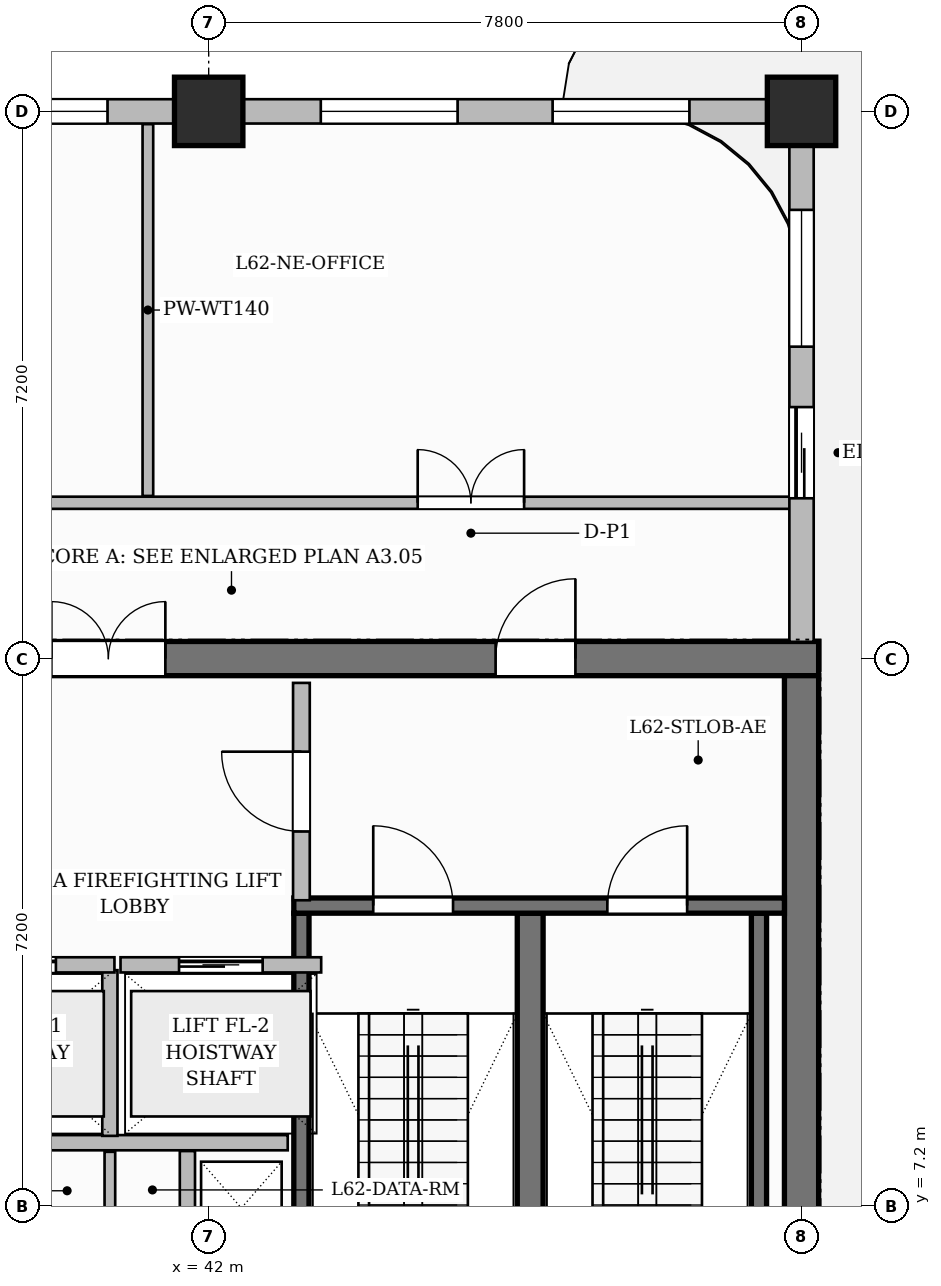
"""IFC4 building model, lengths in metres.
Left out: names, types, materials, properties, quantities, classifications, styles, units other than length and angle.
Written with IfcOpenShell. Run it as: python <this file> out.ifc"""

import sys

from ifc_helpers import new_model, si_unit, direction, frame, frame_2d, origin, origin_2d, place, context, subcontext, project, spatial, rectangle, extrude, source, transform, mapped, element, fill, save


model = new_model("IFC4")
c1 = context("Model", 3, precision=1e-05, world=origin(), true_north=direction((0.0, 1.0)))
c2 = subcontext(c1, "Body", "Model", "MODEL_VIEW")
j1 = project(units=[si_unit("LENGTHUNIT", "METRE"), si_unit("PLANEANGLEUNIT", "RADIAN")], contexts=[c1])
p1 = place(None, origin())
s1 = spatial("IfcSite", under=j1, at=p1, CompositionType="ELEMENT")
p2 = place(p1, origin())
s2 = spatial("IfcBuilding", under=s1, at=p2, CompositionType="ELEMENT")
p3 = place(p2, frame((0.0, 0.0, 248.1)))
s3 = spatial("IfcBuildingStorey", under=s2, at=p3, CompositionType="ELEMENT", Elevation=248.1)
p4 = place(p3, frame((34.575, 14.4, 0.0), z_axis=(0.0, 0.0, 1.0), x_axis=(1.0, 0.0, 0.0)))
e1 = element("IfcWall", 1, at=p4, inside=s3, PredefinedType="SHEAR", context=c2, shape_type="SweptSolid", body=[
    extrude(rectangle(XDim=15.45, YDim=0.45, at=frame_2d((7.725, 0.0))), origin(), (0.0, 0.0, 1.0), 3.85),
])
p5 = place(p4, frame((5.355, 0.0, 0.0)))
e2 = element("IfcOpeningElement", 2, at=p5, cuts=e1, PredefinedType="OPENING", context=c2, shape_type="SweptSolid", body=[
    extrude(rectangle(XDim=1.5, YDim=2.2, at=frame_2d((0.75, 1.1))), frame((0.0, 0.235, 0.0), z_axis=(0.0, -1.0, 0.0), x_axis=(1.0, 0.0, 0.0)), (0.0, 0.0, 1.0), 0.47),
])
p6 = place(p4, frame((1.57, 0.0, 0.0)))
e3 = element("IfcOpeningElement", 3, at=p6, cuts=e1, PredefinedType="OPENING", context=c2, shape_type="SweptSolid", body=[
    extrude(rectangle(XDim=1.05, YDim=2.15, at=frame_2d((0.525, 1.075))), frame((0.0, 0.235, 0.0), z_axis=(0.0, -1.0, 0.0), x_axis=(1.0, 0.0, 0.0)), (0.0, 0.0, 1.0), 0.47),
])
p7 = place(p4, frame((11.2, 0.0, 0.0)))
e4 = element("IfcOpeningElement", 4, at=p7, cuts=e1, PredefinedType="OPENING", context=c2, shape_type="SweptSolid", body=[
    extrude(rectangle(XDim=1.05, YDim=2.15, at=frame_2d((0.525, 1.075))), frame((0.0, 0.235, 0.0), z_axis=(0.0, -1.0, 0.0), x_axis=(1.0, 0.0, 0.0)), (0.0, 0.0, 1.0), 0.47),
])
p8 = place(p3, frame((49.8, 3.825, 0.0), z_axis=(0.0, 0.0, 1.0), x_axis=(0.0, 1.0, 0.0)))
e5 = element("IfcWall", 5, at=p8, inside=s3, PredefinedType="SHEAR", context=c2, shape_type="SweptSolid", body=[
    extrude(rectangle(XDim=10.35, YDim=0.45, at=frame_2d((5.175, 0.0))), origin(), (0.0, 0.0, 1.0), 3.85),
])
m1 = source(origin(), c2, "Body", "SweptSolid", [
    extrude(rectangle(XDim=0.9, YDim=0.9, at=origin_2d()), origin(), (0.0, 0.0, 1.0), 3.85),
])
for number, where, z_axis, x_axis in (
    (6, (42.0, 21.6, 0.0), (0.0, 0.0, 1.0), (1.0, 0.0, 0.0)),
    (7, (49.8, 21.6, 0.0), (0.0, 0.0, 1.0), (1.0, 0.0, 0.0)),
):
    element("IfcColumn", number, at=place(p3, frame(where, z_axis=z_axis, x_axis=x_axis)), inside=s3, PredefinedType="COLUMN", context=c2, shape_type="MappedRepresentation", body=[
        mapped(m1, transform((0.0, 0.0, 0.0), scale=1.0)),
    ])
p9 = place(p3, frame((43.22, 4.1, 0.0), z_axis=(0.0, 0.0, 1.0), x_axis=(0.0, 1.0, 0.0)))
e8 = element("IfcWall", 8, at=p9, inside=s3, PredefinedType="SHEAR", context=c2, shape_type="SweptSolid", body=[
    extrude(rectangle(XDim=6.95, YDim=0.2, at=frame_2d((3.475, 0.0))), origin(), (0.0, 0.0, 1.0), 3.85),
])
p10 = place(p3, frame((46.23, 4.1, 0.0), z_axis=(0.0, 0.0, 1.0), x_axis=(0.0, 1.0, 0.0)))
e9 = element("IfcWall", 9, at=p10, inside=s3, PredefinedType="SHEAR", context=c2, shape_type="SweptSolid", body=[
    extrude(rectangle(XDim=6.95, YDim=0.34, at=frame_2d((3.475, 0.0))), origin(), (0.0, 0.0, 1.0), 3.85),
])
p11 = place(p3, frame((49.24, 4.1, 0.0), z_axis=(0.0, 0.0, 1.0), x_axis=(0.0, 1.0, 0.0)))
e10 = element("IfcWall", 10, at=p11, inside=s3, PredefinedType="SHEAR", context=c2, shape_type="SweptSolid", body=[
    extrude(rectangle(XDim=6.95, YDim=0.2, at=frame_2d((3.475, 0.0))), origin(), (0.0, 0.0, 1.0), 3.85),
])
p12 = place(p3, frame((43.12, 11.15, 0.0), z_axis=(0.0, 0.0, 1.0), x_axis=(1.0, 0.0, 0.0)))
e11 = element("IfcWall", 11, at=p12, inside=s3, PredefinedType="SHEAR", context=c2, shape_type="SweptSolid", body=[
    extrude(rectangle(XDim=6.455, YDim=0.2, at=frame_2d((3.228, 0.0))), origin(), (0.0, 0.0, 1.0), 3.85),
])
p13 = place(p12, frame((1.045, 0.0, 0.0)))
e12 = element("IfcOpeningElement", 12, at=p13, cuts=e11, PredefinedType="OPENING", context=c2, shape_type="SweptSolid", body=[
    extrude(rectangle(XDim=1.05, YDim=2.2, at=frame_2d((0.525, 1.1))), frame((0.0, 0.11, 0.0), z_axis=(0.0, -1.0, 0.0), x_axis=(1.0, 0.0, 0.0)), (0.0, 0.0, 1.0), 0.22),
])
p14 = place(p12, frame((4.125, 0.0, 0.0)))
e13 = element("IfcOpeningElement", 13, at=p14, cuts=e11, PredefinedType="OPENING", context=c2, shape_type="SweptSolid", body=[
    extrude(rectangle(XDim=1.05, YDim=2.2, at=frame_2d((0.525, 1.1))), frame((0.0, 0.11, 0.0), z_axis=(0.0, -1.0, 0.0), x_axis=(1.0, 0.0, 0.0)), (0.0, 0.0, 1.0), 0.22),
])
p15 = place(p3, frame((38.3, 8.03, 0.0), z_axis=(0.0, 0.0, 1.0), x_axis=(1.0, 0.0, 0.0)))
e14 = element("IfcWall", 14, at=p15, inside=s3, PredefinedType="PARTITIONING", context=c2, shape_type="SweptSolid", body=[
    extrude(rectangle(XDim=4.74, YDim=0.2, at=frame_2d((2.37, 0.0))), origin(), (0.0, 0.0, 1.0), 3.6),
])
p16 = place(p3, frame((40.7, 8.12, 0.0), z_axis=(0.0, 0.0, 1.0), x_axis=(0.0, 1.0, 0.0)))
e15 = element("IfcWall", 15, at=p16, inside=s3, PredefinedType="PARTITIONING", context=c2, shape_type="SweptSolid", body=[
    extrude(rectangle(XDim=2.18, YDim=0.2, at=frame_2d((1.09, 0.0))), origin(), (0.0, 0.0, 1.0), 3.6),
])
p17 = place(p3, frame((43.22, 11.22, 0.0), z_axis=(0.0, 0.0, 1.0), x_axis=(0.0, 1.0, 0.0)))
e16 = element("IfcWall", 16, at=p17, inside=s3, PredefinedType="PARTITIONING", context=c2, shape_type="SweptSolid", body=[
    extrude(rectangle(XDim=2.86, YDim=0.22, at=frame_2d((1.43, 0.0))), origin(), (0.0, 0.0, 1.0), 3.6),
])
p18 = place(p17, frame((0.905, 0.0, 0.0)))
e17 = element("IfcOpeningElement", 17, at=p18, cuts=e16, PredefinedType="OPENING", context=c2, shape_type="SweptSolid", body=[
    extrude(rectangle(XDim=1.05, YDim=2.15, at=frame_2d((0.525, 1.075))), frame((0.0, 0.12, 0.0), z_axis=(0.0, -1.0, 0.0), x_axis=(1.0, 0.0, 0.0)), (0.0, 0.0, 1.0), 0.24),
])
p19 = place(p3, frame((41.72, 6.13, 0.0), z_axis=(0.0, 0.0, 1.0), x_axis=(0.0, 1.0, 0.0)))
e18 = element("IfcWall", 18, at=p19, inside=s3, PredefinedType="PARTITIONING", context=c2, shape_type="SweptSolid", body=[
    extrude(rectangle(XDim=1.79, YDim=0.2, at=frame_2d((0.895, 0.0))), origin(), (0.0, 0.0, 1.0), 3.6),
])
p20 = place(p3, frame((40.7, 3.845, 0.0), z_axis=(0.0, 0.0, 1.0), x_axis=(0.0, 1.0, 0.0)))
e19 = element("IfcWall", 19, at=p20, inside=s3, PredefinedType="PARTITIONING", context=c2, shape_type="SweptSolid", body=[
    extrude(rectangle(XDim=4.065, YDim=0.14, at=frame_2d((2.032, 0.0))), origin(), (0.0, 0.0, 1.0), 3.6),
])
p21 = place(p3, frame((30.29, 16.45, 0.0), z_axis=(0.0, 0.0, 1.0), x_axis=(1.0, 0.0, 0.0)))
e20 = element("IfcWall", 20, at=p21, inside=s3, PredefinedType="PARTITIONING", context=c2, shape_type="SweptSolid", body=[
    extrude(rectangle(XDim=19.37, YDim=0.16, at=frame_2d((9.685, 0.0))), origin(), (0.0, 0.0, 1.0), 3.6),
])
p22 = place(p21, frame((1.185, 0.0, 0.0)))
e21 = element("IfcOpeningElement", 21, at=p22, cuts=e20, PredefinedType="OPENING", context=c2, shape_type="SweptSolid", body=[
    extrude(rectangle(XDim=0.85, YDim=2.1, at=frame_2d((0.425, 1.05))), frame((0.0, 0.09, 0.0), z_axis=(0.0, -1.0, 0.0), x_axis=(1.0, 0.0, 0.0)), (0.0, 0.0, 1.0), 0.18),
])
p23 = place(p21, frame((6.66, 0.0, 0.0)))
e22 = element("IfcOpeningElement", 22, at=p23, cuts=e20, PredefinedType="OPENING", context=c2, shape_type="SweptSolid", body=[
    extrude(rectangle(XDim=0.9, YDim=2.15, at=frame_2d((0.45, 1.075))), frame((0.0, 0.09, 0.0), z_axis=(0.0, -1.0, 0.0), x_axis=(1.0, 0.0, 0.0)), (0.0, 0.0, 1.0), 0.18),
])
p24 = place(p21, frame((14.46, 0.0, 0.0)))
e23 = element("IfcOpeningElement", 23, at=p24, cuts=e20, PredefinedType="OPENING", context=c2, shape_type="SweptSolid", body=[
    extrude(rectangle(XDim=1.4, YDim=2.35, at=frame_2d((0.7, 1.175))), frame((0.0, 0.09, 0.0), z_axis=(0.0, -1.0, 0.0), x_axis=(1.0, 0.0, 0.0)), (0.0, 0.0, 1.0), 0.18),
])
p25 = place(p3, frame((41.2, 16.54, 0.0), z_axis=(0.0, 0.0, 1.0), x_axis=(0.0, 1.0, 0.0)))
e24 = element("IfcWall", 24, at=p25, inside=s3, PredefinedType="PARTITIONING", context=c2, shape_type="SweptSolid", body=[
    extrude(rectangle(XDim=4.892, YDim=0.14, at=frame_2d((2.446, 0.0))), origin(), (0.0, 0.0, 1.0), 3.6),
])
p26 = place(p3, frame((38.12, 10.37, 0.0), z_axis=(0.0, 0.0, 1.0), x_axis=(1.0, 0.0, 0.0)))
e25 = element("IfcWall", 25, at=p26, inside=s3, PredefinedType="PARTITIONING", context=c2, shape_type="SweptSolid", body=[
    extrude(rectangle(XDim=2.64, YDim=0.2, at=frame_2d((1.32, 0.0))), origin(), (0.0, 0.0, 1.0), 3.6),
])
p27 = place(p26, frame((0.77, 0.0, 0.0)))
e26 = element("IfcOpeningElement", 26, at=p27, cuts=e25, PredefinedType="OPENING", context=c2, shape_type="SweptSolid", body=[
    extrude(rectangle(XDim=1.1, YDim=2.2, at=frame_2d((0.55, 1.1))), frame((0.0, 0.11, 0.0), z_axis=(0.0, -1.0, 0.0), x_axis=(1.0, 0.0, 0.0)), (0.0, 0.0, 1.0), 0.22),
])
p28 = place(p3, frame((40.84, 10.37, 0.0), z_axis=(0.0, 0.0, 1.0), x_axis=(1.0, 0.0, 0.0)))
e27 = element("IfcWall", 27, at=p28, inside=s3, PredefinedType="PARTITIONING", context=c2, shape_type="SweptSolid", body=[
    extrude(rectangle(XDim=2.64, YDim=0.2, at=frame_2d((1.32, 0.0))), origin(), (0.0, 0.0, 1.0), 3.6),
])
p29 = place(p28, frame((0.77, 0.0, 0.0)))
e28 = element("IfcOpeningElement", 28, at=p29, cuts=e27, PredefinedType="OPENING", context=c2, shape_type="SweptSolid", body=[
    extrude(rectangle(XDim=1.1, YDim=2.2, at=frame_2d((0.55, 1.1))), frame((0.0, 0.11, 0.0), z_axis=(0.0, -1.0, 0.0), x_axis=(1.0, 0.0, 0.0)), (0.0, 0.0, 1.0), 0.22),
])
p30 = place(p3, frame((49.8, 14.62, 0.0), z_axis=(0.0, 0.0, 1.0), x_axis=(0.0, 1.0, 0.0)))
e29 = element("IfcWall", 29, at=p30, inside=s3, PredefinedType="SOLIDWALL", context=c2, shape_type="SweptSolid", body=[
    extrude(rectangle(XDim=6.93, YDim=0.32, at=frame_2d((3.465, 0.0))), origin(), (0.0, 0.0, 1.0), 3.135),
])
p31 = place(p30, frame((1.889, 0.0, 0.0)))
e30 = element("IfcOpeningElement", 30, at=p31, cuts=e29, PredefinedType="OPENING", context=c2, shape_type="SweptSolid", body=[
    extrude(rectangle(XDim=1.2, YDim=2.2, at=frame_2d((0.6, 1.1))), frame((0.0, 0.17, 0.0), z_axis=(0.0, -1.0, 0.0), x_axis=(1.0, 0.0, 0.0)), (0.0, 0.0, 1.0), 0.34),
])
p32 = place(p30, frame((3.884, 0.0, 0.8)))
e31 = element("IfcOpeningElement", 31, at=p32, cuts=e29, PredefinedType="OPENING", context=c2, shape_type="SweptSolid", body=[
    extrude(rectangle(XDim=1.8, YDim=1.85, at=frame_2d((0.9, 0.925))), frame((0.0, 0.17, 0.0), z_axis=(0.0, -1.0, 0.0), x_axis=(1.0, 0.0, 0.0)), (0.0, 0.0, 1.0), 0.34),
])
p33 = place(p3, frame((14.4, 21.6, 0.0), z_axis=(0.0, 0.0, 1.0), x_axis=(1.0, 0.0, 0.0)))
e32 = element("IfcWall", 32, at=p33, inside=s3, PredefinedType="SOLIDWALL", context=c2, shape_type="SweptSolid", body=[
    extrude(rectangle(XDim=35.4, YDim=0.32, at=frame_2d((17.7, 0.0))), origin(), (0.0, 0.0, 1.0), 3.135),
])
p34 = place(p33, frame((0.85, 0.0, 0.0)))
e33 = element("IfcOpeningElement", 33, at=p34, cuts=e32, PredefinedType="OPENING", context=c2, shape_type="SweptSolid", body=[
    extrude(rectangle(XDim=1.2, YDim=2.2, at=frame_2d((0.6, 1.1))), frame((0.0, 0.17, 0.0), z_axis=(0.0, -1.0, 0.0), x_axis=(1.0, 0.0, 0.0)), (0.0, 0.0, 1.0), 0.34),
])
p35 = place(p33, frame((2.771, 0.0, 0.8)))
e34 = element("IfcOpeningElement", 34, at=p35, cuts=e32, PredefinedType="OPENING", context=c2, shape_type="SweptSolid", body=[
    extrude(rectangle(XDim=1.4, YDim=1.85, at=frame_2d((0.7, 0.925))), frame((0.0, 0.17, 0.0), z_axis=(0.0, -1.0, 0.0), x_axis=(1.0, 0.0, 0.0)), (0.0, 0.0, 1.0), 0.34),
])
p36 = place(p33, frame((4.929, 0.0, 0.8)))
e35 = element("IfcOpeningElement", 35, at=p36, cuts=e32, PredefinedType="OPENING", context=c2, shape_type="SweptSolid", body=[
    extrude(rectangle(XDim=1.15, YDim=1.8, at=frame_2d((0.575, 0.9))), frame((0.0, 0.17, 0.0), z_axis=(0.0, -1.0, 0.0), x_axis=(1.0, 0.0, 0.0)), (0.0, 0.0, 1.0), 0.34),
])
p37 = place(p33, frame((8.496, 0.0, 0.8)))
e36 = element("IfcOpeningElement", 36, at=p37, cuts=e32, PredefinedType="OPENING", context=c2, shape_type="SweptSolid", body=[
    extrude(rectangle(XDim=1.8, YDim=1.85, at=frame_2d((0.9, 0.925))), frame((0.0, 0.17, 0.0), z_axis=(0.0, -1.0, 0.0), x_axis=(1.0, 0.0, 0.0)), (0.0, 0.0, 1.0), 0.34),
])
p38 = place(p33, frame((11.304, 0.0, 0.8)))
e37 = element("IfcOpeningElement", 37, at=p38, cuts=e32, PredefinedType="OPENING", context=c2, shape_type="SweptSolid", body=[
    extrude(rectangle(XDim=1.8, YDim=1.85, at=frame_2d((0.9, 0.925))), frame((0.0, 0.17, 0.0), z_axis=(0.0, -1.0, 0.0), x_axis=(1.0, 0.0, 0.0)), (0.0, 0.0, 1.0), 0.34),
])
p39 = place(p33, frame((16.601, 0.0, 0.8)))
e38 = element("IfcOpeningElement", 38, at=p39, cuts=e32, PredefinedType="OPENING", context=c2, shape_type="SweptSolid", body=[
    extrude(rectangle(XDim=1.8, YDim=1.85, at=frame_2d((0.9, 0.925))), frame((0.0, 0.17, 0.0), z_axis=(0.0, -1.0, 0.0), x_axis=(1.0, 0.0, 0.0)), (0.0, 0.0, 1.0), 0.34),
])
p40 = place(p33, frame((21.723, 0.0, 0.8)))
e39 = element("IfcOpeningElement", 39, at=p40, cuts=e32, PredefinedType="OPENING", context=c2, shape_type="SweptSolid", body=[
    extrude(rectangle(XDim=1.8, YDim=1.85, at=frame_2d((0.9, 0.925))), frame((0.0, 0.17, 0.0), z_axis=(0.0, -1.0, 0.0), x_axis=(1.0, 0.0, 0.0)), (0.0, 0.0, 1.0), 0.34),
])
p41 = place(p33, frame((24.469, 0.0, 0.8)))
e40 = element("IfcOpeningElement", 40, at=p41, cuts=e32, PredefinedType="OPENING", context=c2, shape_type="SweptSolid", body=[
    extrude(rectangle(XDim=1.8, YDim=1.85, at=frame_2d((0.9, 0.925))), frame((0.0, 0.17, 0.0), z_axis=(0.0, -1.0, 0.0), x_axis=(1.0, 0.0, 0.0)), (0.0, 0.0, 1.0), 0.34),
])
p42 = place(p33, frame((29.075, 0.0, 0.8)))
e41 = element("IfcOpeningElement", 41, at=p42, cuts=e32, PredefinedType="OPENING", context=c2, shape_type="SweptSolid", body=[
    extrude(rectangle(XDim=1.8, YDim=1.85, at=frame_2d((0.9, 0.925))), frame((0.0, 0.17, 0.0), z_axis=(0.0, -1.0, 0.0), x_axis=(1.0, 0.0, 0.0)), (0.0, 0.0, 1.0), 0.34),
])
p43 = place(p33, frame((32.125, 0.0, 0.8)))
e42 = element("IfcOpeningElement", 42, at=p43, cuts=e32, PredefinedType="OPENING", context=c2, shape_type="SweptSolid", body=[
    extrude(rectangle(XDim=1.8, YDim=1.85, at=frame_2d((0.9, 0.925))), frame((0.0, 0.17, 0.0), z_axis=(0.0, -1.0, 0.0), x_axis=(1.0, 0.0, 0.0)), (0.0, 0.0, 1.0), 0.34),
])
m2 = source(origin(), c2, "Body", "SweptSolid", [
    extrude(rectangle(XDim=1.05, YDim=2.2, at=frame_2d((0.525, 1.1))), frame((0.0, 0.025, 0.0), z_axis=(0.0, -1.0, 0.0), x_axis=(1.0, 0.0, 0.0)), (0.0, 0.0, 1.0), 0.05),
])
p44 = place(p13, origin())
e43 = element("IfcDoor", 43, at=p44, inside=s3, OperationType="SINGLE_SWING_LEFT", PredefinedType="DOOR", context=c2, shape_type="MappedRepresentation", body=[
    mapped(m2, transform((0.0, 0.0, 0.0), scale=1.0)),
])
fill(e12, e43)
p45 = place(p14, origin())
e44 = element("IfcDoor", 44, at=p45, inside=s3, OperationType="SINGLE_SWING_RIGHT", PredefinedType="DOOR", context=c2, shape_type="MappedRepresentation", body=[
    mapped(m2, transform((0.0, 0.0, 0.0), scale=1.0)),
])
fill(e13, e44)
m3 = source(origin(), c2, "Body", "SweptSolid", [
    extrude(rectangle(XDim=1.05, YDim=2.15, at=frame_2d((0.525, 1.075))), frame((0.0, 0.025, 0.0), z_axis=(0.0, -1.0, 0.0), x_axis=(1.0, 0.0, 0.0)), (0.0, 0.0, 1.0), 0.05),
])
p46 = place(p18, origin())
e45 = element("IfcDoor", 45, at=p46, inside=s3, OperationType="SINGLE_SWING_RIGHT", PredefinedType="DOOR", context=c2, shape_type="MappedRepresentation", body=[
    mapped(m3, transform((0.0, 0.0, 0.0), scale=1.0)),
])
fill(e17, e45)
m4 = source(origin(), c2, "Body", "SweptSolid", [
    extrude(rectangle(XDim=1.5, YDim=2.2, at=frame_2d((0.75, 1.1))), frame((0.0, 0.025, 0.0), z_axis=(0.0, -1.0, 0.0), x_axis=(1.0, 0.0, 0.0)), (0.0, 0.0, 1.0), 0.05),
])
p47 = place(p5, origin())
e46 = element("IfcDoor", 46, at=p47, inside=s3, OperationType="DOUBLE_DOOR_SINGLE_SWING", PredefinedType="DOOR", context=c2, shape_type="MappedRepresentation", body=[
    mapped(m4, transform((0.0, 0.0, 0.0), scale=1.0)),
])
fill(e2, e46)
p48 = place(p7, origin())
e47 = element("IfcDoor", 47, at=p48, inside=s3, OperationType="SINGLE_SWING_RIGHT", PredefinedType="DOOR", context=c2, shape_type="MappedRepresentation", body=[
    mapped(m3, transform((0.0, 0.0, 0.0), scale=1.0)),
])
fill(e4, e47)
m5 = source(origin(), c2, "Body", "SweptSolid", [
    extrude(rectangle(XDim=1.4, YDim=2.35, at=frame_2d((0.7, 1.175))), frame((0.0, 0.025, 0.0), z_axis=(0.0, -1.0, 0.0), x_axis=(1.0, 0.0, 0.0)), (0.0, 0.0, 1.0), 0.05),
])
p49 = place(p24, origin())
e48 = element("IfcDoor", 48, at=p49, inside=s3, OperationType="DOUBLE_DOOR_SINGLE_SWING", PredefinedType="DOOR", context=c2, shape_type="MappedRepresentation", body=[
    mapped(m5, transform((0.0, 0.0, 0.0), scale=1.0)),
])
fill(e23, e48)
m6 = source(origin(), c2, "Body", "SweptSolid", [
    extrude(rectangle(XDim=1.1, YDim=2.2, at=frame_2d((0.55, 1.1))), frame((0.0, 0.025, 0.0), z_axis=(0.0, -1.0, 0.0), x_axis=(1.0, 0.0, 0.0)), (0.0, 0.0, 1.0), 0.05),
])
p50 = place(p27, origin())
e49 = element("IfcDoor", 49, at=p50, inside=s3, OperationType="SLIDING_TO_LEFT", PredefinedType="DOOR", context=c2, shape_type="MappedRepresentation", body=[
    mapped(m6, transform((0.0, 0.0, 0.0), scale=1.0)),
])
fill(e26, e49)
p51 = place(p29, origin())
e50 = element("IfcDoor", 50, at=p51, inside=s3, OperationType="SLIDING_TO_LEFT", PredefinedType="DOOR", context=c2, shape_type="MappedRepresentation", body=[
    mapped(m6, transform((0.0, 0.0, 0.0), scale=1.0)),
])
fill(e28, e50)
m7 = source(origin(), c2, "Body", "SweptSolid", [
    extrude(rectangle(XDim=1.2, YDim=2.2, at=frame_2d((0.6, 1.1))), frame((0.0, 0.025, 0.0), z_axis=(0.0, -1.0, 0.0), x_axis=(1.0, 0.0, 0.0)), (0.0, 0.0, 1.0), 0.05),
])
p52 = place(p31, origin())
e51 = element("IfcDoor", 51, at=p52, inside=s3, OperationType="SLIDING_TO_LEFT", PredefinedType="DOOR", context=c2, shape_type="MappedRepresentation", body=[
    mapped(m7, transform((0.0, 0.0, 0.0), scale=1.0)),
])
fill(e30, e51)
m8 = source(origin(), c2, "Body", "SweptSolid", [
    extrude(rectangle(XDim=1.8, YDim=1.85, at=frame_2d((0.9, 0.925))), frame((0.0, 0.03, 0.0), z_axis=(0.0, -1.0, 0.0), x_axis=(1.0, 0.0, 0.0)), (0.0, 0.0, 1.0), 0.06),
])
p53 = place(p32, origin())
e52 = element("IfcWindow", 52, at=p53, inside=s3, PartitioningType="DOUBLE_PANEL_VERTICAL", PredefinedType="WINDOW", context=c2, shape_type="MappedRepresentation", body=[
    mapped(m8, transform((0.0, 0.0, 0.0), scale=1.0)),
])
fill(e31, e52)
p54 = place(p41, origin())
e53 = element("IfcWindow", 53, at=p54, inside=s3, PartitioningType="DOUBLE_PANEL_VERTICAL", PredefinedType="WINDOW", context=c2, shape_type="MappedRepresentation", body=[
    mapped(m8, transform((0.0, 0.0, 0.0), scale=1.0)),
])
fill(e40, e53)
p55 = place(p42, origin())
e54 = element("IfcWindow", 54, at=p55, inside=s3, PartitioningType="DOUBLE_PANEL_VERTICAL", PredefinedType="WINDOW", context=c2, shape_type="MappedRepresentation", body=[
    mapped(m8, transform((0.0, 0.0, 0.0), scale=1.0)),
])
fill(e41, e54)
p56 = place(p43, origin())
e55 = element("IfcWindow", 55, at=p56, inside=s3, PartitioningType="DOUBLE_PANEL_VERTICAL", PredefinedType="WINDOW", context=c2, shape_type="MappedRepresentation", body=[
    mapped(m8, transform((0.0, 0.0, 0.0), scale=1.0)),
])
fill(e42, e55)
save(model, sys.argv[1])
